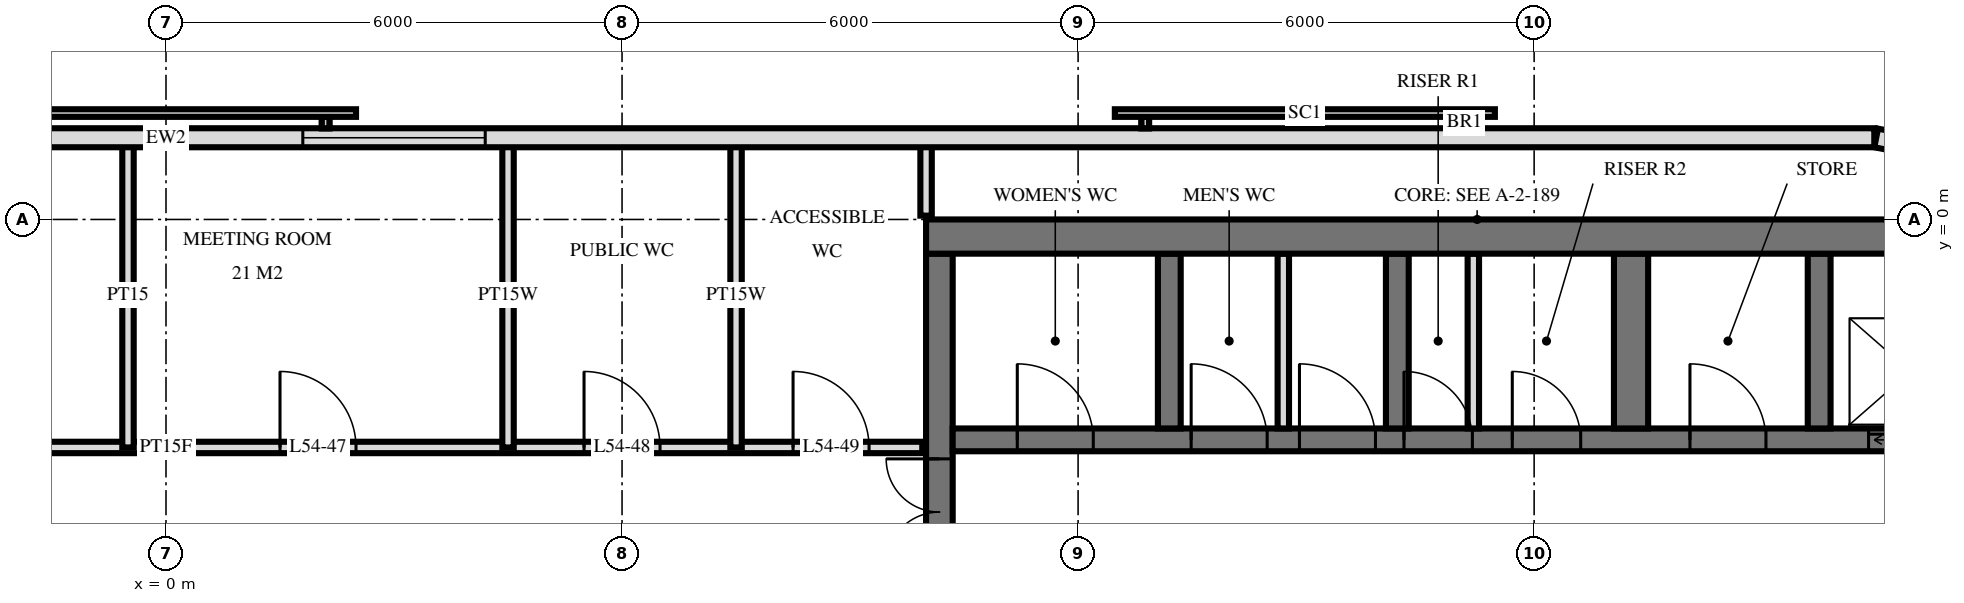
"""IFC4 building model, lengths in metres.
Left out: names, types, materials, properties, quantities, classifications, styles, units other than length and angle.
Written with IfcOpenShell. Run it as: python <this file> out.ifc"""

import sys

from ifc_helpers import new_model, si_unit, direction, frame, frame_2d, origin, place, context, subcontext, project, spatial, rectangle, extrude, element, fill, save


model = new_model("IFC4")
c1 = context("Model", 3, precision=1e-05, world=origin(), true_north=direction((0.0, 1.0)))
c2 = subcontext(c1, "Body", "Model", "MODEL_VIEW")
j1 = project(units=[si_unit("LENGTHUNIT", "METRE"), si_unit("PLANEANGLEUNIT", "RADIAN")], contexts=[c1])
p1 = place(None, origin())
s1 = spatial("IfcSite", under=j1, at=p1, CompositionType="ELEMENT")
p2 = place(p1, origin())
s2 = spatial("IfcBuilding", under=s1, at=p2, CompositionType="ELEMENT")
p3 = place(p2, frame((0.0, 0.0, 208.1)))
s3 = spatial("IfcBuildingStorey", under=s2, at=p3, CompositionType="ELEMENT", Elevation=208.1)
p4 = place(p3, frame((10.0, -0.225, 0.0), z_axis=(0.0, 0.0, 1.0), x_axis=(1.0, 0.0, 0.0)))
e1 = element("IfcWall", 1, at=p4, inside=s3, PredefinedType="SHEAR", context=c2, shape_type="SweptSolid", body=[
    extrude(rectangle(XDim=14.5, YDim=0.45, at=frame_2d((7.25, 0.0))), origin(), (0.0, 0.0, 1.0), 3.5),
])
p5 = place(p3, frame((10.175, -14.55, 0.0), z_axis=(0.0, 0.0, 1.0), x_axis=(0.0, 1.0, 0.0)))
e2 = element("IfcWall", 2, at=p5, inside=s3, PredefinedType="SHEAR", context=c2, shape_type="SweptSolid", body=[
    extrude(rectangle(XDim=14.1, YDim=0.35, at=frame_2d((7.05, 0.0))), origin(), (0.0, 0.0, 1.0), 3.5),
])
p6 = place(p5, frame((8.4, 0.0, 0.0)))
e3 = element("IfcOpeningElement", 3, at=p6, cuts=e2, PredefinedType="OPENING", context=c2, shape_type="SweptSolid", body=[
    extrude(rectangle(XDim=1.4, YDim=2.4, at=frame_2d((0.7, 1.2))), frame((0.0, 0.185, 0.0), z_axis=(0.0, -1.0, 0.0), x_axis=(1.0, 0.0, 0.0)), (0.0, 0.0, 1.0), 0.37),
])
p7 = place(p5, frame((10.0, 0.0, 0.0)))
e4 = element("IfcOpeningElement", 4, at=p7, cuts=e2, PredefinedType="OPENING", context=c2, shape_type="SweptSolid", body=[
    extrude(rectangle(XDim=1.4, YDim=2.4, at=frame_2d((0.7, 1.2))), frame((0.0, 0.185, 0.0), z_axis=(0.0, -1.0, 0.0), x_axis=(1.0, 0.0, 0.0)), (0.0, 0.0, 1.0), 0.37),
])
p8 = place(p5, frame((4.0, 0.0, 0.0)))
e5 = element("IfcOpeningElement", 5, at=p8, cuts=e2, PredefinedType="OPENING", context=c2, shape_type="SweptSolid", body=[
    extrude(rectangle(XDim=1.2, YDim=2.1, at=frame_2d((0.6, 1.05))), frame((0.0, 0.185, 0.0), z_axis=(0.0, -1.0, 0.0), x_axis=(1.0, 0.0, 0.0)), (0.0, 0.0, 1.0), 0.37),
])
p9 = place(p3, frame((10.35, -2.9, 0.0), z_axis=(0.0, 0.0, 1.0), x_axis=(1.0, 0.0, 0.0)))
e6 = element("IfcWall", 6, at=p9, inside=s3, PredefinedType="SHEAR", context=c2, shape_type="SweptSolid", body=[
    extrude(rectangle(XDim=13.7, YDim=0.3, at=frame_2d((6.85, 0.0))), origin(), (0.0, 0.0, 1.0), 3.5),
])
p10 = place(p9, frame((12.05, 0.0, 0.0)))
e7 = element("IfcOpeningElement", 7, at=p10, cuts=e6, PredefinedType="OPENING", context=c2, shape_type="SweptSolid", body=[
    extrude(rectangle(XDim=1.1, YDim=2.1, at=frame_2d((0.55, 1.05))), frame((0.0, 0.16, 0.0), z_axis=(0.0, -1.0, 0.0), x_axis=(1.0, 0.0, 0.0)), (0.0, 0.0, 1.0), 0.32),
])
p11 = place(p9, frame((5.938, 0.0, 0.0)))
e8 = element("IfcOpeningElement", 8, at=p11, cuts=e6, PredefinedType="OPENING", context=c2, shape_type="SweptSolid", body=[
    extrude(rectangle(XDim=0.9, YDim=2.1, at=frame_2d((0.45, 1.05))), frame((0.0, 0.16, 0.0), z_axis=(0.0, -1.0, 0.0), x_axis=(1.0, 0.0, 0.0)), (0.0, 0.0, 1.0), 0.32),
])
p12 = place(p9, frame((7.363, 0.0, 0.0)))
e9 = element("IfcOpeningElement", 9, at=p12, cuts=e6, PredefinedType="OPENING", context=c2, shape_type="SweptSolid", body=[
    extrude(rectangle(XDim=0.9, YDim=2.1, at=frame_2d((0.45, 1.05))), frame((0.0, 0.16, 0.0), z_axis=(0.0, -1.0, 0.0), x_axis=(1.0, 0.0, 0.0)), (0.0, 0.0, 1.0), 0.32),
])
p13 = place(p9, frame((0.85, 0.0, 0.0)))
e10 = element("IfcOpeningElement", 10, at=p13, cuts=e6, PredefinedType="OPENING", context=c2, shape_type="SweptSolid", body=[
    extrude(rectangle(XDim=1.0, YDim=2.1, at=frame_2d((0.5, 1.05))), frame((0.0, 0.16, 0.0), z_axis=(0.0, -1.0, 0.0), x_axis=(1.0, 0.0, 0.0)), (0.0, 0.0, 1.0), 0.32),
])
p14 = place(p9, frame((3.137, 0.0, 0.0)))
e11 = element("IfcOpeningElement", 11, at=p14, cuts=e6, PredefinedType="OPENING", context=c2, shape_type="SweptSolid", body=[
    extrude(rectangle(XDim=1.0, YDim=2.1, at=frame_2d((0.5, 1.05))), frame((0.0, 0.16, 0.0), z_axis=(0.0, -1.0, 0.0), x_axis=(1.0, 0.0, 0.0)), (0.0, 0.0, 1.0), 0.32),
])
p15 = place(p9, frame((4.562, 0.0, 0.0)))
e12 = element("IfcOpeningElement", 12, at=p15, cuts=e6, PredefinedType="OPENING", context=c2, shape_type="SweptSolid", body=[
    extrude(rectangle(XDim=1.0, YDim=2.1, at=frame_2d((0.5, 1.05))), frame((0.0, 0.16, 0.0), z_axis=(0.0, -1.0, 0.0), x_axis=(1.0, 0.0, 0.0)), (0.0, 0.0, 1.0), 0.32),
])
p16 = place(p9, frame((9.7, 0.0, 0.0)))
e13 = element("IfcOpeningElement", 13, at=p16, cuts=e6, PredefinedType="OPENING", context=c2, shape_type="SweptSolid", body=[
    extrude(rectangle(XDim=1.0, YDim=2.1, at=frame_2d((0.5, 1.05))), frame((0.0, 0.16, 0.0), z_axis=(0.0, -1.0, 0.0), x_axis=(1.0, 0.0, 0.0)), (0.0, 0.0, 1.0), 0.32),
])
for number, where, z_axis, x_axis in (
    (14, (13.2, -2.75, 0.0), (0.0, 0.0, 1.0), (0.0, 1.0, 0.0)),
    (15, (16.2, -2.75, 0.0), (0.0, 0.0, 1.0), (0.0, 1.0, 0.0)),
):
    element("IfcWall", number, at=place(p3, frame(where, z_axis=z_axis, x_axis=x_axis)), inside=s3, PredefinedType="SHEAR", context=c2, shape_type="SweptSolid", body=[
        extrude(rectangle(XDim=2.3, YDim=0.3, at=frame_2d((1.15, 0.0))), origin(), (0.0, 0.0, 1.0), 3.5),
    ])
p17 = place(p3, frame((19.275, -2.75, 0.0), z_axis=(0.0, 0.0, 1.0), x_axis=(0.0, 1.0, 0.0)))
e16 = element("IfcWall", 16, at=p17, inside=s3, PredefinedType="SHEAR", context=c2, shape_type="SweptSolid", body=[
    extrude(rectangle(XDim=2.3, YDim=0.45, at=frame_2d((1.15, 0.0))), origin(), (0.0, 0.0, 1.0), 3.5),
])
p18 = place(p3, frame((21.75, -2.75, 0.0), z_axis=(0.0, 0.0, 1.0), x_axis=(0.0, 1.0, 0.0)))
e17 = element("IfcWall", 17, at=p18, inside=s3, PredefinedType="SHEAR", context=c2, shape_type="SweptSolid", body=[
    extrude(rectangle(XDim=2.3, YDim=0.3, at=frame_2d((1.15, 0.0))), origin(), (0.0, 0.0, 1.0), 3.5),
])
p19 = place(p3, frame((24.149, 0.745, 0.0), z_axis=(0.0, 0.0, 1.0), x_axis=(-0.980803419081, 0.194999110559, 0.0)))
e18 = element("IfcWall", 18, at=p19, inside=s3, PredefinedType="SOLIDWALL", context=c2, shape_type="SweptSolid", body=[
    extrude(rectangle(XDim=1.681, YDim=0.25, at=frame_2d((0.841, 0.0))), origin(), (0.0, 0.0, 1.0), 3.22),
])
p20 = place(p3, frame((22.475, 1.075, 0.0), z_axis=(0.0, 0.0, 1.0), x_axis=(-1.0, 0.0, 0.0)))
e19 = element("IfcWall", 19, at=p20, inside=s3, PredefinedType="SOLIDWALL", context=c2, shape_type="SweptSolid", body=[
    extrude(rectangle(XDim=44.951, YDim=0.25, at=frame_2d((22.475, 0.0))), origin(), (0.0, 0.0, 1.0), 3.22),
])
p21 = place(p20, frame((18.275, 0.0, 0.9)))
e20 = element("IfcOpeningElement", 20, at=p21, cuts=e19, PredefinedType="OPENING", context=c2, shape_type="SweptSolid", body=[
    extrude(rectangle(XDim=2.4, YDim=1.5, at=frame_2d((1.2, 0.75))), frame((0.0, 0.135, 0.0), z_axis=(0.0, -1.0, 0.0), x_axis=(1.0, 0.0, 0.0)), (0.0, 0.0, 1.0), 0.27),
])
p22 = place(p20, frame((24.275, 0.0, 0.9)))
e21 = element("IfcOpeningElement", 21, at=p22, cuts=e19, PredefinedType="OPENING", context=c2, shape_type="SweptSolid", body=[
    extrude(rectangle(XDim=2.4, YDim=1.5, at=frame_2d((1.2, 0.75))), frame((0.0, 0.135, 0.0), z_axis=(0.0, -1.0, 0.0), x_axis=(1.0, 0.0, 0.0)), (0.0, 0.0, 1.0), 0.27),
])
p23 = place(p20, frame((27.275, 0.0, 0.9)))
e22 = element("IfcOpeningElement", 22, at=p23, cuts=e19, PredefinedType="OPENING", context=c2, shape_type="SweptSolid", body=[
    extrude(rectangle(XDim=2.4, YDim=1.5, at=frame_2d((1.2, 0.75))), frame((0.0, 0.135, 0.0), z_axis=(0.0, -1.0, 0.0), x_axis=(1.0, 0.0, 0.0)), (0.0, 0.0, 1.0), 0.27),
])
for number, where, z_axis, x_axis in (
    (23, (17.2, -2.75, 0.0), (0.0, 0.0, 1.0), (0.0, 1.0, 0.0)),
    (24, (14.7, -2.75, 0.0), (0.0, 0.0, 1.0), (0.0, 1.0, 0.0)),
):
    element("IfcWall", number, at=place(p3, frame(where, z_axis=z_axis, x_axis=x_axis)), inside=s3, PredefinedType="PARTITIONING", context=c2, shape_type="SweptSolid", body=[
        extrude(rectangle(XDim=2.3, YDim=0.15, at=frame_2d((1.15, 0.0))), origin(), (0.0, 0.0, 1.0), 3.2),
    ])
p24 = place(p3, frame((10.0, 0.05, 0.0), z_axis=(0.0, 0.0, 1.0), x_axis=(0.0, 1.0, 0.0)))
e25 = element("IfcWall", 25, at=p24, inside=s3, PredefinedType="PLUMBINGWALL", context=c2, shape_type="SweptSolid", body=[
    extrude(rectangle(XDim=0.97, YDim=0.15, at=frame_2d((0.485, 0.0))), origin(), (0.0, 0.0, 1.0), 3.22),
])
for number, where, z_axis, x_axis in (
    (26, (7.5, -3.0, 0.0), (0.0, 0.0, 1.0), (0.0, 1.0, 0.0)),
    (27, (4.5, -3.0, 0.0), (0.0, 0.0, 1.0), (0.0, 1.0, 0.0)),
):
    element("IfcWall", number, at=place(p3, frame(where, z_axis=z_axis, x_axis=x_axis)), inside=s3, PredefinedType="PLUMBINGWALL", context=c2, shape_type="SweptSolid", body=[
        extrude(rectangle(XDim=4.02, YDim=0.15, at=frame_2d((2.01, 0.0))), origin(), (0.0, 0.0, 1.0), 3.22),
    ])
p25 = place(p3, frame((-0.5, -3.0, 0.0), z_axis=(0.0, 0.0, 1.0), x_axis=(0.0, 1.0, 0.0)))
e28 = element("IfcWall", 28, at=p25, inside=s3, PredefinedType="PARTITIONING", context=c2, shape_type="SweptSolid", body=[
    extrude(rectangle(XDim=4.02, YDim=0.15, at=frame_2d((2.01, 0.0))), origin(), (0.0, 0.0, 1.0), 3.22),
])
p26 = place(p3, frame((-9.95, -3.0, 0.0), z_axis=(0.0, 0.0, 1.0), x_axis=(1.0, 0.0, 0.0)))
e29 = element("IfcWall", 29, at=p26, inside=s3, PredefinedType="PARTITIONING", context=c2, shape_type="SweptSolid", body=[
    extrude(rectangle(XDim=19.9, YDim=0.15, at=frame_2d((9.95, 0.0))), origin(), (0.0, 0.0, 1.0), 3.22),
])
p27 = place(p26, frame((4.2, 0.0, 0.0)))
e30 = element("IfcOpeningElement", 30, at=p27, cuts=e29, PredefinedType="OPENING", context=c2, shape_type="SweptSolid", body=[
    extrude(rectangle(XDim=1.0, YDim=2.1, at=frame_2d((0.5, 1.05))), frame((0.0, 0.085, 0.0), z_axis=(0.0, -1.0, 0.0), x_axis=(1.0, 0.0, 0.0)), (0.0, 0.0, 1.0), 0.17),
])
p28 = place(p26, frame((11.45, 0.0, 0.0)))
e31 = element("IfcOpeningElement", 31, at=p28, cuts=e29, PredefinedType="OPENING", context=c2, shape_type="SweptSolid", body=[
    extrude(rectangle(XDim=1.0, YDim=2.1, at=frame_2d((0.5, 1.05))), frame((0.0, 0.085, 0.0), z_axis=(0.0, -1.0, 0.0), x_axis=(1.0, 0.0, 0.0)), (0.0, 0.0, 1.0), 0.17),
])
p29 = place(p26, frame((15.45, 0.0, 0.0)))
e32 = element("IfcOpeningElement", 32, at=p29, cuts=e29, PredefinedType="OPENING", context=c2, shape_type="SweptSolid", body=[
    extrude(rectangle(XDim=1.0, YDim=2.1, at=frame_2d((0.5, 1.05))), frame((0.0, 0.085, 0.0), z_axis=(0.0, -1.0, 0.0), x_axis=(1.0, 0.0, 0.0)), (0.0, 0.0, 1.0), 0.17),
])
p30 = place(p26, frame((18.2, 0.0, 0.0)))
e33 = element("IfcOpeningElement", 33, at=p30, cuts=e29, PredefinedType="OPENING", context=c2, shape_type="SweptSolid", body=[
    extrude(rectangle(XDim=1.0, YDim=2.1, at=frame_2d((0.5, 1.05))), frame((0.0, 0.085, 0.0), z_axis=(0.0, -1.0, 0.0), x_axis=(1.0, 0.0, 0.0)), (0.0, 0.0, 1.0), 0.17),
])
p31 = place(p21, origin())
e34 = element("IfcWindow", 34, at=p31, inside=s3, PartitioningType="SINGLE_PANEL", PredefinedType="WINDOW", context=c2, shape_type="SweptSolid", body=[
    extrude(rectangle(XDim=2.4, YDim=1.5, at=frame_2d((1.2, 0.75))), frame((0.0, 0.03, 0.0), z_axis=(0.0, -1.0, 0.0), x_axis=(1.0, 0.0, 0.0)), (0.0, 0.0, 1.0), 0.06),
])
fill(e20, e34)
p32 = place(p10, origin())
e35 = element("IfcDoor", 35, at=p32, inside=s3, OperationType="DOUBLE_DOOR_SLIDING", PredefinedType="USERDEFINED", context=c2, shape_type="SweptSolid", body=[
    extrude(rectangle(XDim=1.1, YDim=2.1, at=frame_2d((0.55, 1.05))), frame((0.0, 0.025, 0.0), z_axis=(0.0, -1.0, 0.0), x_axis=(1.0, 0.0, 0.0)), (0.0, 0.0, 1.0), 0.05),
])
fill(e7, e35)
p33 = place(p7, origin())
e36 = element("IfcDoor", 36, at=p33, inside=s3, OperationType="DOUBLE_DOOR_SINGLE_SWING", PredefinedType="DOOR", context=c2, shape_type="SweptSolid", body=[
    extrude(rectangle(XDim=1.4, YDim=2.4, at=frame_2d((0.7, 1.2))), frame((0.0, 0.025, 0.0), z_axis=(0.0, -1.0, 0.0), x_axis=(1.0, 0.0, 0.0)), (0.0, 0.0, 1.0), 0.05),
])
fill(e4, e36)
p34 = place(p11, origin())
e37 = element("IfcDoor", 37, at=p34, inside=s3, OperationType="SINGLE_SWING_RIGHT", PredefinedType="DOOR", context=c2, shape_type="SweptSolid", body=[
    extrude(rectangle(XDim=0.9, YDim=2.1, at=frame_2d((0.45, 1.05))), frame((0.0, 0.025, 0.0), z_axis=(0.0, -1.0, 0.0), x_axis=(1.0, 0.0, 0.0)), (0.0, 0.0, 1.0), 0.05),
])
fill(e8, e37)
p35 = place(p12, origin())
e38 = element("IfcDoor", 38, at=p35, inside=s3, OperationType="SINGLE_SWING_RIGHT", PredefinedType="DOOR", context=c2, shape_type="SweptSolid", body=[
    extrude(rectangle(XDim=0.9, YDim=2.1, at=frame_2d((0.45, 1.05))), frame((0.0, 0.025, 0.0), z_axis=(0.0, -1.0, 0.0), x_axis=(1.0, 0.0, 0.0)), (0.0, 0.0, 1.0), 0.05),
])
fill(e9, e38)
p36 = place(p13, origin())
e39 = element("IfcDoor", 39, at=p36, inside=s3, OperationType="SINGLE_SWING_RIGHT", PredefinedType="DOOR", context=c2, shape_type="SweptSolid", body=[
    extrude(rectangle(XDim=1.0, YDim=2.1, at=frame_2d((0.5, 1.05))), frame((0.0, 0.025, 0.0), z_axis=(0.0, -1.0, 0.0), x_axis=(1.0, 0.0, 0.0)), (0.0, 0.0, 1.0), 0.05),
])
fill(e10, e39)
p37 = place(p14, origin())
e40 = element("IfcDoor", 40, at=p37, inside=s3, OperationType="SINGLE_SWING_RIGHT", PredefinedType="DOOR", context=c2, shape_type="SweptSolid", body=[
    extrude(rectangle(XDim=1.0, YDim=2.1, at=frame_2d((0.5, 1.05))), frame((0.0, 0.025, 0.0), z_axis=(0.0, -1.0, 0.0), x_axis=(1.0, 0.0, 0.0)), (0.0, 0.0, 1.0), 0.05),
])
fill(e11, e40)
p38 = place(p15, origin())
e41 = element("IfcDoor", 41, at=p38, inside=s3, OperationType="SINGLE_SWING_RIGHT", PredefinedType="DOOR", context=c2, shape_type="SweptSolid", body=[
    extrude(rectangle(XDim=1.0, YDim=2.1, at=frame_2d((0.5, 1.05))), frame((0.0, 0.025, 0.0), z_axis=(0.0, -1.0, 0.0), x_axis=(1.0, 0.0, 0.0)), (0.0, 0.0, 1.0), 0.05),
])
fill(e12, e41)
p39 = place(p16, origin())
e42 = element("IfcDoor", 42, at=p39, inside=s3, OperationType="SINGLE_SWING_RIGHT", PredefinedType="DOOR", context=c2, shape_type="SweptSolid", body=[
    extrude(rectangle(XDim=1.0, YDim=2.1, at=frame_2d((0.5, 1.05))), frame((0.0, 0.025, 0.0), z_axis=(0.0, -1.0, 0.0), x_axis=(1.0, 0.0, 0.0)), (0.0, 0.0, 1.0), 0.05),
])
fill(e13, e42)
p40 = place(p28, origin())
e43 = element("IfcDoor", 43, at=p40, inside=s3, OperationType="SINGLE_SWING_RIGHT", PredefinedType="DOOR", context=c2, shape_type="SweptSolid", body=[
    extrude(rectangle(XDim=1.0, YDim=2.1, at=frame_2d((0.5, 1.05))), frame((0.0, 0.025, 0.0), z_axis=(0.0, -1.0, 0.0), x_axis=(1.0, 0.0, 0.0)), (0.0, 0.0, 1.0), 0.05),
])
fill(e31, e43)
p41 = place(p29, origin())
e44 = element("IfcDoor", 44, at=p41, inside=s3, OperationType="SINGLE_SWING_RIGHT", PredefinedType="DOOR", context=c2, shape_type="SweptSolid", body=[
    extrude(rectangle(XDim=1.0, YDim=2.1, at=frame_2d((0.5, 1.05))), frame((0.0, 0.025, 0.0), z_axis=(0.0, -1.0, 0.0), x_axis=(1.0, 0.0, 0.0)), (0.0, 0.0, 1.0), 0.05),
])
fill(e32, e44)
p42 = place(p30, origin())
e45 = element("IfcDoor", 45, at=p42, inside=s3, OperationType="SINGLE_SWING_RIGHT", PredefinedType="DOOR", context=c2, shape_type="SweptSolid", body=[
    extrude(rectangle(XDim=1.0, YDim=2.1, at=frame_2d((0.5, 1.05))), frame((0.0, 0.025, 0.0), z_axis=(0.0, -1.0, 0.0), x_axis=(1.0, 0.0, 0.0)), (0.0, 0.0, 1.0), 0.05),
])
fill(e33, e45)
save(model, sys.argv[1])
